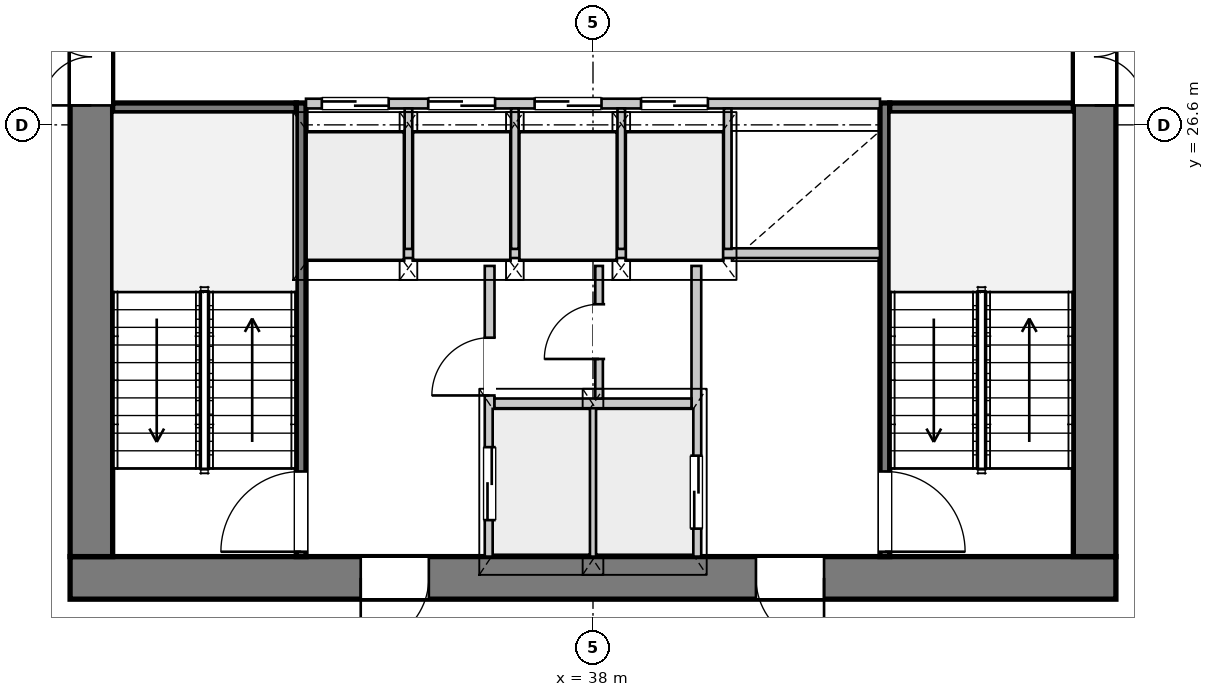
"""IFC4 building model, lengths in metres.
Left out: names, types, materials, properties, quantities, classifications, styles, units other than length and angle.
Written with IfcOpenShell. Run it as: python <this file> out.ifc"""

import sys

from ifc_helpers import new_model, si_unit, direction, frame, frame_2d, origin, place, context, subcontext, project, spatial, rectangle, extrude, source, transform, mapped, element, fill, save


model = new_model("IFC4")
c1 = context("Model", 3, precision=1e-05, world=origin(), true_north=direction((0.0, 1.0)))
c2 = subcontext(c1, "Body", "Model", "MODEL_VIEW")
j1 = project(units=[si_unit("LENGTHUNIT", "METRE"), si_unit("PLANEANGLEUNIT", "RADIAN")], contexts=[c1])
p1 = place(None, origin())
s1 = spatial("IfcSite", under=j1, at=p1, CompositionType="ELEMENT")
p2 = place(p1, origin())
s2 = spatial("IfcBuilding", under=s1, at=p2, CompositionType="ELEMENT")
p3 = place(p2, frame((0.0, 0.0, 84.4)))
s3 = spatial("IfcBuildingStorey", under=s2, at=p3, CompositionType="ELEMENT", Elevation=84.4)
p4 = place(p3, frame((46.6, 19.15, 0.0), z_axis=(0.0, 0.0, 1.0), x_axis=(-1.0, 0.0, 0.0)))
e1 = element("IfcWall", 1, at=p4, inside=s3, PredefinedType="SHEAR", context=c2, shape_type="SweptSolid", body=[
    extrude(rectangle(XDim=17.2, YDim=0.7, at=frame_2d((8.6, 0.0))), origin(), (0.0, 0.0, 1.0), 3.3),
])
p5 = place(p4, frame((4.8, 0.0, 0.0)))
e2 = element("IfcOpeningElement", 2, at=p5, cuts=e1, PredefinedType="OPENING", context=c2, shape_type="SweptSolid", body=[
    extrude(rectangle(XDim=1.12, YDim=2.25, at=frame_2d((0.56, 1.125))), frame((0.0, 0.36, 0.0), z_axis=(0.0, -1.0, 0.0), x_axis=(1.0, 0.0, 0.0)), (0.0, 0.0, 1.0), 0.72),
])
p6 = place(p4, frame((11.3, 0.0, 0.0)))
e3 = element("IfcOpeningElement", 3, at=p6, cuts=e1, PredefinedType="OPENING", context=c2, shape_type="SweptSolid", body=[
    extrude(rectangle(XDim=1.12, YDim=2.25, at=frame_2d((0.56, 1.125))), frame((0.0, 0.36, 0.0), z_axis=(0.0, -1.0, 0.0), x_axis=(1.0, 0.0, 0.0)), (0.0, 0.0, 1.0), 0.72),
])
p7 = place(p3, frame((29.75, 19.5, 0.0), z_axis=(0.0, 0.0, 1.0), x_axis=(0.0, 1.0, 0.0)))
e4 = element("IfcWall", 4, at=p7, inside=s3, PredefinedType="SHEAR", context=c2, shape_type="SweptSolid", body=[
    extrude(rectangle(XDim=14.2, YDim=0.7, at=frame_2d((7.1, 0.0))), origin(), (0.0, 0.0, 1.0), 3.3),
])
p8 = place(p7, frame((7.42, 0.0, 0.0)))
e5 = element("IfcOpeningElement", 5, at=p8, cuts=e4, PredefinedType="OPENING", context=c2, shape_type="SweptSolid", body=[
    extrude(rectangle(XDim=1.6, YDim=2.2, at=frame_2d((0.8, 1.1))), frame((0.0, 0.36, 0.0), z_axis=(0.0, -1.0, 0.0), x_axis=(1.0, 0.0, 0.0)), (0.0, 0.0, 1.0), 0.72),
])
p9 = place(p3, frame((46.25, 33.7, 0.0), z_axis=(0.0, 0.0, 1.0), x_axis=(0.0, -1.0, 0.0)))
e6 = element("IfcWall", 6, at=p9, inside=s3, PredefinedType="SHEAR", context=c2, shape_type="SweptSolid", body=[
    extrude(rectangle(XDim=14.2, YDim=0.7, at=frame_2d((7.1, 0.0))), origin(), (0.0, 0.0, 1.0), 3.3),
])
p10 = place(p9, frame((5.18, 0.0, 0.0)))
e7 = element("IfcOpeningElement", 7, at=p10, cuts=e6, PredefinedType="OPENING", context=c2, shape_type="SweptSolid", body=[
    extrude(rectangle(XDim=1.6, YDim=2.2, at=frame_2d((0.8, 1.1))), frame((0.0, 0.36, 0.0), z_axis=(0.0, -1.0, 0.0), x_axis=(1.0, 0.0, 0.0)), (0.0, 0.0, 1.0), 0.72),
])
p11 = place(p3, frame((33.2, 19.5, 0.0), z_axis=(0.0, 0.0, 1.0), x_axis=(0.0, 1.0, 0.0)))
e8 = element("IfcWall", 8, at=p11, inside=s3, PredefinedType="PARTITIONING", context=c2, shape_type="SweptSolid", body=[
    extrude(rectangle(XDim=7.46, YDim=0.16, at=frame_2d((3.73, 0.0))), origin(), (0.0, 0.0, 1.0), 3.3),
])
p12 = place(p11, frame((0.08, 0.0, 0.0)))
e9 = element("IfcOpeningElement", 9, at=p12, cuts=e8, PredefinedType="OPENING", context=c2, shape_type="SweptSolid", body=[
    extrude(rectangle(XDim=1.32, YDim=2.2, at=frame_2d((0.66, 1.1))), frame((0.0, 0.09, 0.0), z_axis=(0.0, -1.0, 0.0), x_axis=(1.0, 0.0, 0.0)), (0.0, 0.0, 1.0), 0.18),
])
p13 = place(p3, frame((30.1, 26.88, 0.0), z_axis=(0.0, 0.0, 1.0), x_axis=(1.0, 0.0, 0.0)))
e10 = element("IfcWall", 10, at=p13, inside=s3, PredefinedType="PARTITIONING", context=c2, shape_type="SweptSolid", body=[
    extrude(rectangle(XDim=3.02, YDim=0.16, at=frame_2d((1.51, 0.0))), origin(), (0.0, 0.0, 1.0), 3.3),
])
p14 = place(p3, frame((42.8, 26.96, 0.0), z_axis=(0.0, 0.0, 1.0), x_axis=(0.0, -1.0, 0.0)))
e11 = element("IfcWall", 11, at=p14, inside=s3, PredefinedType="PARTITIONING", context=c2, shape_type="SweptSolid", body=[
    extrude(rectangle(XDim=7.46, YDim=0.16, at=frame_2d((3.73, 0.0))), origin(), (0.0, 0.0, 1.0), 3.3),
])
p15 = place(p14, frame((6.06, 0.0, 0.0)))
e12 = element("IfcOpeningElement", 12, at=p15, cuts=e11, PredefinedType="OPENING", context=c2, shape_type="SweptSolid", body=[
    extrude(rectangle(XDim=1.32, YDim=2.2, at=frame_2d((0.66, 1.1))), frame((0.0, 0.09, 0.0), z_axis=(0.0, -1.0, 0.0), x_axis=(1.0, 0.0, 0.0)), (0.0, 0.0, 1.0), 0.18),
])
p16 = place(p3, frame((42.88, 26.88, 0.0), z_axis=(0.0, 0.0, 1.0), x_axis=(1.0, 0.0, 0.0)))
e13 = element("IfcWall", 13, at=p16, inside=s3, PredefinedType="PARTITIONING", context=c2, shape_type="SweptSolid", body=[
    extrude(rectangle(XDim=3.02, YDim=0.16, at=frame_2d((1.51, 0.0))), origin(), (0.0, 0.0, 1.0), 3.3),
])
p17 = place(p3, frame((36.3, 19.5, 0.0), z_axis=(0.0, 0.0, 1.0), x_axis=(0.0, 1.0, 0.0)))
e14 = element("IfcWall", 14, at=p17, inside=s3, PredefinedType="PARTITIONING", context=c2, shape_type="SweptSolid", body=[
    extrude(rectangle(XDim=4.78, YDim=0.16, at=frame_2d((2.39, 0.0))), origin(), (0.0, 0.0, 1.0), 3.3),
])
p18 = place(p17, frame((0.6, 0.0, 0.0)))
e15 = element("IfcOpeningElement", 15, at=p18, cuts=e14, PredefinedType="OPENING", context=c2, shape_type="SweptSolid", body=[
    extrude(rectangle(XDim=1.2, YDim=2.2, at=frame_2d((0.6, 1.1))), frame((0.0, 0.09, 0.0), z_axis=(0.0, -1.0, 0.0), x_axis=(1.0, 0.0, 0.0)), (0.0, 0.0, 1.0), 0.18),
])
p19 = place(p17, frame((2.65, 0.0, 0.0)))
e16 = element("IfcOpeningElement", 16, at=p19, cuts=e14, PredefinedType="OPENING", context=c2, shape_type="SweptSolid", body=[
    extrude(rectangle(XDim=0.95, YDim=2.1, at=frame_2d((0.475, 1.05))), frame((0.0, 0.09, 0.0), z_axis=(0.0, -1.0, 0.0), x_axis=(1.0, 0.0, 0.0)), (0.0, 0.0, 1.0), 0.18),
])
p20 = place(p3, frame((39.7, 24.28, 0.0), z_axis=(0.0, 0.0, 1.0), x_axis=(0.0, -1.0, 0.0)))
e17 = element("IfcWall", 17, at=p20, inside=s3, PredefinedType="PARTITIONING", context=c2, shape_type="SweptSolid", body=[
    extrude(rectangle(XDim=4.78, YDim=0.16, at=frame_2d((2.39, 0.0))), origin(), (0.0, 0.0, 1.0), 3.3),
])
p21 = place(p20, frame((3.12, 0.0, 0.0)))
e18 = element("IfcOpeningElement", 18, at=p21, cuts=e17, PredefinedType="OPENING", context=c2, shape_type="SweptSolid", body=[
    extrude(rectangle(XDim=1.2, YDim=2.2, at=frame_2d((0.6, 1.1))), frame((0.0, 0.09, 0.0), z_axis=(0.0, -1.0, 0.0), x_axis=(1.0, 0.0, 0.0)), (0.0, 0.0, 1.0), 0.18),
])
p22 = place(p3, frame((38.0, 19.5, 0.0), z_axis=(0.0, 0.0, 1.0), x_axis=(0.0, 1.0, 0.0)))
e19 = element("IfcWall", 19, at=p22, inside=s3, PredefinedType="PARTITIONING", context=c2, shape_type="SweptSolid", body=[
    extrude(rectangle(XDim=2.46, YDim=0.125, at=frame_2d((1.23, 0.0))), origin(), (0.0, 0.0, 1.0), 3.3),
])
p23 = place(p3, frame((36.38, 22.02, 0.0), z_axis=(0.0, 0.0, 1.0), x_axis=(1.0, 0.0, 0.0)))
e20 = element("IfcWall", 20, at=p23, inside=s3, PredefinedType="PARTITIONING", context=c2, shape_type="SweptSolid", body=[
    extrude(rectangle(XDim=3.24, YDim=0.16, at=frame_2d((1.62, 0.0))), origin(), (0.0, 0.0, 1.0), 3.3),
])
p24 = place(p3, frame((33.28, 24.49, 0.0), z_axis=(0.0, 0.0, 1.0), x_axis=(1.0, 0.0, 0.0)))
e21 = element("IfcWall", 21, at=p24, inside=s3, PredefinedType="PARTITIONING", context=c2, shape_type="SweptSolid", body=[
    extrude(rectangle(XDim=9.44, YDim=0.16, at=frame_2d((4.72, 0.0))), origin(), (0.0, 0.0, 1.0), 3.3),
])
p25 = place(p3, frame((38.1, 22.1, 0.0), z_axis=(0.0, 0.0, 1.0), x_axis=(0.0, 1.0, 0.0)))
e22 = element("IfcWall", 22, at=p25, inside=s3, PredefinedType="PARTITIONING", context=c2, shape_type="SweptSolid", body=[
    extrude(rectangle(XDim=2.18, YDim=0.125, at=frame_2d((1.09, 0.0))), origin(), (0.0, 0.0, 1.0), 3.3),
])
p26 = place(p25, frame((0.65, 0.0, 0.0)))
e23 = element("IfcOpeningElement", 23, at=p26, cuts=e22, PredefinedType="OPENING", context=c2, shape_type="SweptSolid", body=[
    extrude(rectangle(XDim=0.9, YDim=2.1, at=frame_2d((0.45, 1.05))), frame((0.0, 0.073, 0.0), z_axis=(0.0, -1.0, 0.0), x_axis=(1.0, 0.0, 0.0)), (0.0, 0.0, 1.0), 0.145),
])
p27 = place(p3, frame((33.28, 26.95, 0.0), z_axis=(0.0, 0.0, 1.0), x_axis=(1.0, 0.0, 0.0)))
e24 = element("IfcWall", 24, at=p27, inside=s3, PredefinedType="PARTITIONING", context=c2, shape_type="SweptSolid", body=[
    extrude(rectangle(XDim=9.44, YDim=0.16, at=frame_2d((4.72, 0.0))), origin(), (0.0, 0.0, 1.0), 3.3),
])
p28 = place(p27, frame((0.26, 0.0, 0.0)))
e25 = element("IfcOpeningElement", 25, at=p28, cuts=e24, PredefinedType="OPENING", context=c2, shape_type="SweptSolid", body=[
    extrude(rectangle(XDim=1.1, YDim=2.2, at=frame_2d((0.55, 1.1))), frame((0.0, 0.09, 0.0), z_axis=(0.0, -1.0, 0.0), x_axis=(1.0, 0.0, 0.0)), (0.0, 0.0, 1.0), 0.18),
])
p29 = place(p27, frame((2.01, 0.0, 0.0)))
e26 = element("IfcOpeningElement", 26, at=p29, cuts=e24, PredefinedType="OPENING", context=c2, shape_type="SweptSolid", body=[
    extrude(rectangle(XDim=1.1, YDim=2.2, at=frame_2d((0.55, 1.1))), frame((0.0, 0.09, 0.0), z_axis=(0.0, -1.0, 0.0), x_axis=(1.0, 0.0, 0.0)), (0.0, 0.0, 1.0), 0.18),
])
p30 = place(p27, frame((3.76, 0.0, 0.0)))
e27 = element("IfcOpeningElement", 27, at=p30, cuts=e24, PredefinedType="OPENING", context=c2, shape_type="SweptSolid", body=[
    extrude(rectangle(XDim=1.1, YDim=2.2, at=frame_2d((0.55, 1.1))), frame((0.0, 0.09, 0.0), z_axis=(0.0, -1.0, 0.0), x_axis=(1.0, 0.0, 0.0)), (0.0, 0.0, 1.0), 0.18),
])
p31 = place(p27, frame((5.51, 0.0, 0.0)))
e28 = element("IfcOpeningElement", 28, at=p31, cuts=e24, PredefinedType="OPENING", context=c2, shape_type="SweptSolid", body=[
    extrude(rectangle(XDim=1.1, YDim=2.2, at=frame_2d((0.55, 1.1))), frame((0.0, 0.09, 0.0), z_axis=(0.0, -1.0, 0.0), x_axis=(1.0, 0.0, 0.0)), (0.0, 0.0, 1.0), 0.18),
])
for number, where, z_axis, x_axis in (
    (29, (34.965, 24.56, 0.0), (0.0, 0.0, 1.0), (0.0, 1.0, 0.0)),
    (30, (36.715, 24.56, 0.0), (0.0, 0.0, 1.0), (0.0, 1.0, 0.0)),
    (31, (38.465, 24.56, 0.0), (0.0, 0.0, 1.0), (0.0, 1.0, 0.0)),
    (32, (40.215, 24.56, 0.0), (0.0, 0.0, 1.0), (0.0, 1.0, 0.0)),
):
    element("IfcWall", number, at=place(p3, frame(where, z_axis=z_axis, x_axis=x_axis)), inside=s3, PredefinedType="PARTITIONING", context=c2, shape_type="SweptSolid", body=[
        extrude(rectangle(XDim=2.31, YDim=0.125, at=frame_2d((1.155, 0.0))), origin(), (0.0, 0.0, 1.0), 3.3),
    ])
m1 = source(origin(), c2, "Body", "SweptSolid", [
    extrude(rectangle(XDim=1.12, YDim=2.25, at=frame_2d((0.56, 1.125))), frame((0.0, 0.025, 0.0), z_axis=(0.0, -1.0, 0.0), x_axis=(1.0, 0.0, 0.0)), (0.0, 0.0, 1.0), 0.05),
])
p32 = place(p5, origin())
e33 = element("IfcDoor", 33, at=p32, inside=s3, OperationType="SINGLE_SWING_LEFT", PredefinedType="DOOR", context=c2, shape_type="MappedRepresentation", body=[
    mapped(m1, transform((0.0, 0.0, 0.0), x_axis=(1.0, 0.0, 0.0), y_axis=(0.0, 1.0, 0.0), z_axis=(0.0, 0.0, 1.0), scale=1.0)),
])
fill(e2, e33)
p33 = place(p6, origin())
e34 = element("IfcDoor", 34, at=p33, inside=s3, OperationType="SINGLE_SWING_RIGHT", PredefinedType="DOOR", context=c2, shape_type="MappedRepresentation", body=[
    mapped(m1, transform((0.0, 0.0, 0.0), x_axis=(1.0, 0.0, 0.0), y_axis=(0.0, 1.0, 0.0), z_axis=(0.0, 0.0, 1.0), scale=1.0)),
])
fill(e3, e34)
m2 = source(origin(), c2, "Body", "SweptSolid", [
    extrude(rectangle(XDim=1.6, YDim=2.2, at=frame_2d((0.8, 1.1))), frame((0.0, 0.025, 0.0), z_axis=(0.0, -1.0, 0.0), x_axis=(1.0, 0.0, 0.0)), (0.0, 0.0, 1.0), 0.05),
])
p34 = place(p8, origin())
e35 = element("IfcDoor", 35, at=p34, inside=s3, OperationType="DOUBLE_DOOR_SINGLE_SWING", PredefinedType="DOOR", context=c2, shape_type="MappedRepresentation", body=[
    mapped(m2, transform((0.0, 0.0, 0.0), x_axis=(1.0, 0.0, 0.0), y_axis=(0.0, 1.0, 0.0), z_axis=(0.0, 0.0, 1.0), scale=1.0)),
])
fill(e5, e35)
p35 = place(p10, origin())
e36 = element("IfcDoor", 36, at=p35, inside=s3, OperationType="DOUBLE_DOOR_SINGLE_SWING", PredefinedType="DOOR", context=c2, shape_type="MappedRepresentation", body=[
    mapped(m2, transform((0.0, 0.0, 0.0), x_axis=(1.0, 0.0, 0.0), y_axis=(0.0, 1.0, 0.0), z_axis=(0.0, 0.0, 1.0), scale=1.0)),
])
fill(e7, e36)
m3 = source(origin(), c2, "Body", "SweptSolid", [
    extrude(rectangle(XDim=1.32, YDim=2.2, at=frame_2d((0.66, 1.1))), frame((0.0, 0.025, 0.0), z_axis=(0.0, -1.0, 0.0), x_axis=(1.0, 0.0, 0.0)), (0.0, 0.0, 1.0), 0.05),
])
p36 = place(p12, origin())
e37 = element("IfcDoor", 37, at=p36, inside=s3, OperationType="SINGLE_SWING_LEFT", PredefinedType="DOOR", context=c2, shape_type="MappedRepresentation", body=[
    mapped(m3, transform((0.0, 0.0, 0.0), x_axis=(1.0, 0.0, 0.0), y_axis=(0.0, 1.0, 0.0), z_axis=(0.0, 0.0, 1.0), scale=1.0)),
])
fill(e9, e37)
p37 = place(p15, origin())
e38 = element("IfcDoor", 38, at=p37, inside=s3, OperationType="SINGLE_SWING_RIGHT", PredefinedType="DOOR", context=c2, shape_type="MappedRepresentation", body=[
    mapped(m3, transform((0.0, 0.0, 0.0), x_axis=(1.0, 0.0, 0.0), y_axis=(0.0, 1.0, 0.0), z_axis=(0.0, 0.0, 1.0), scale=1.0)),
])
fill(e12, e38)
m4 = source(origin(), c2, "Body", "SweptSolid", [
    extrude(rectangle(XDim=1.2, YDim=2.2, at=frame_2d((0.6, 1.1))), frame((0.0, 0.025, 0.0), z_axis=(0.0, -1.0, 0.0), x_axis=(1.0, 0.0, 0.0)), (0.0, 0.0, 1.0), 0.05),
])
p38 = place(p18, origin())
e39 = element("IfcDoor", 39, at=p38, inside=s3, OperationType="DOUBLE_DOOR_SLIDING", PredefinedType="DOOR", context=c2, shape_type="MappedRepresentation", body=[
    mapped(m4, transform((0.0, 0.0, 0.0), x_axis=(1.0, 0.0, 0.0), y_axis=(0.0, 1.0, 0.0), z_axis=(0.0, 0.0, 1.0), scale=1.0)),
])
fill(e15, e39)
m5 = source(origin(), c2, "Body", "SweptSolid", [
    extrude(rectangle(XDim=0.95, YDim=2.1, at=frame_2d((0.475, 1.05))), frame((0.0, 0.025, 0.0), z_axis=(0.0, -1.0, 0.0), x_axis=(1.0, 0.0, 0.0)), (0.0, 0.0, 1.0), 0.05),
])
p39 = place(p19, origin())
e40 = element("IfcDoor", 40, at=p39, inside=s3, OperationType="SINGLE_SWING_LEFT", PredefinedType="DOOR", context=c2, shape_type="MappedRepresentation", body=[
    mapped(m5, transform((0.0, 0.0, 0.0), x_axis=(1.0, 0.0, 0.0), y_axis=(0.0, 1.0, 0.0), z_axis=(0.0, 0.0, 1.0), scale=1.0)),
])
fill(e16, e40)
m6 = source(origin(), c2, "Body", "SweptSolid", [
    extrude(rectangle(XDim=0.9, YDim=2.1, at=frame_2d((0.45, 1.05))), frame((0.0, 0.025, 0.0), z_axis=(0.0, -1.0, 0.0), x_axis=(1.0, 0.0, 0.0)), (0.0, 0.0, 1.0), 0.05),
])
p40 = place(p26, origin())
e41 = element("IfcDoor", 41, at=p40, inside=s3, OperationType="SINGLE_SWING_LEFT", PredefinedType="DOOR", context=c2, shape_type="MappedRepresentation", body=[
    mapped(m6, transform((0.0, 0.0, 0.0), x_axis=(1.0, 0.0, 0.0), y_axis=(0.0, 1.0, 0.0), z_axis=(0.0, 0.0, 1.0), scale=1.0)),
])
fill(e23, e41)
p41 = place(p21, origin())
e42 = element("IfcDoor", 42, at=p41, inside=s3, OperationType="DOUBLE_DOOR_SLIDING", PredefinedType="DOOR", context=c2, shape_type="MappedRepresentation", body=[
    mapped(m4, transform((0.0, 0.0, 0.0), x_axis=(1.0, 0.0, 0.0), y_axis=(0.0, 1.0, 0.0), z_axis=(0.0, 0.0, 1.0), scale=1.0)),
])
fill(e18, e42)
m7 = source(origin(), c2, "Body", "SweptSolid", [
    extrude(rectangle(XDim=1.1, YDim=2.2, at=frame_2d((0.55, 1.1))), frame((0.0, 0.025, 0.0), z_axis=(0.0, -1.0, 0.0), x_axis=(1.0, 0.0, 0.0)), (0.0, 0.0, 1.0), 0.05),
])
p42 = place(p28, origin())
e43 = element("IfcDoor", 43, at=p42, inside=s3, OperationType="DOUBLE_DOOR_SLIDING", PredefinedType="DOOR", context=c2, shape_type="MappedRepresentation", body=[
    mapped(m7, transform((0.0, 0.0, 0.0), x_axis=(1.0, 0.0, 0.0), y_axis=(0.0, 1.0, 0.0), z_axis=(0.0, 0.0, 1.0), scale=1.0)),
])
fill(e25, e43)
p43 = place(p29, origin())
e44 = element("IfcDoor", 44, at=p43, inside=s3, OperationType="DOUBLE_DOOR_SLIDING", PredefinedType="DOOR", context=c2, shape_type="MappedRepresentation", body=[
    mapped(m7, transform((0.0, 0.0, 0.0), x_axis=(1.0, 0.0, 0.0), y_axis=(0.0, 1.0, 0.0), z_axis=(0.0, 0.0, 1.0), scale=1.0)),
])
fill(e26, e44)
p44 = place(p30, origin())
e45 = element("IfcDoor", 45, at=p44, inside=s3, OperationType="DOUBLE_DOOR_SLIDING", PredefinedType="DOOR", context=c2, shape_type="MappedRepresentation", body=[
    mapped(m7, transform((0.0, 0.0, 0.0), x_axis=(1.0, 0.0, 0.0), y_axis=(0.0, 1.0, 0.0), z_axis=(0.0, 0.0, 1.0), scale=1.0)),
])
fill(e27, e45)
p45 = place(p31, origin())
e46 = element("IfcDoor", 46, at=p45, inside=s3, OperationType="DOUBLE_DOOR_SLIDING", PredefinedType="DOOR", context=c2, shape_type="MappedRepresentation", body=[
    mapped(m7, transform((0.0, 0.0, 0.0), x_axis=(1.0, 0.0, 0.0), y_axis=(0.0, 1.0, 0.0), z_axis=(0.0, 0.0, 1.0), scale=1.0)),
])
fill(e28, e46)
save(model, sys.argv[1])
